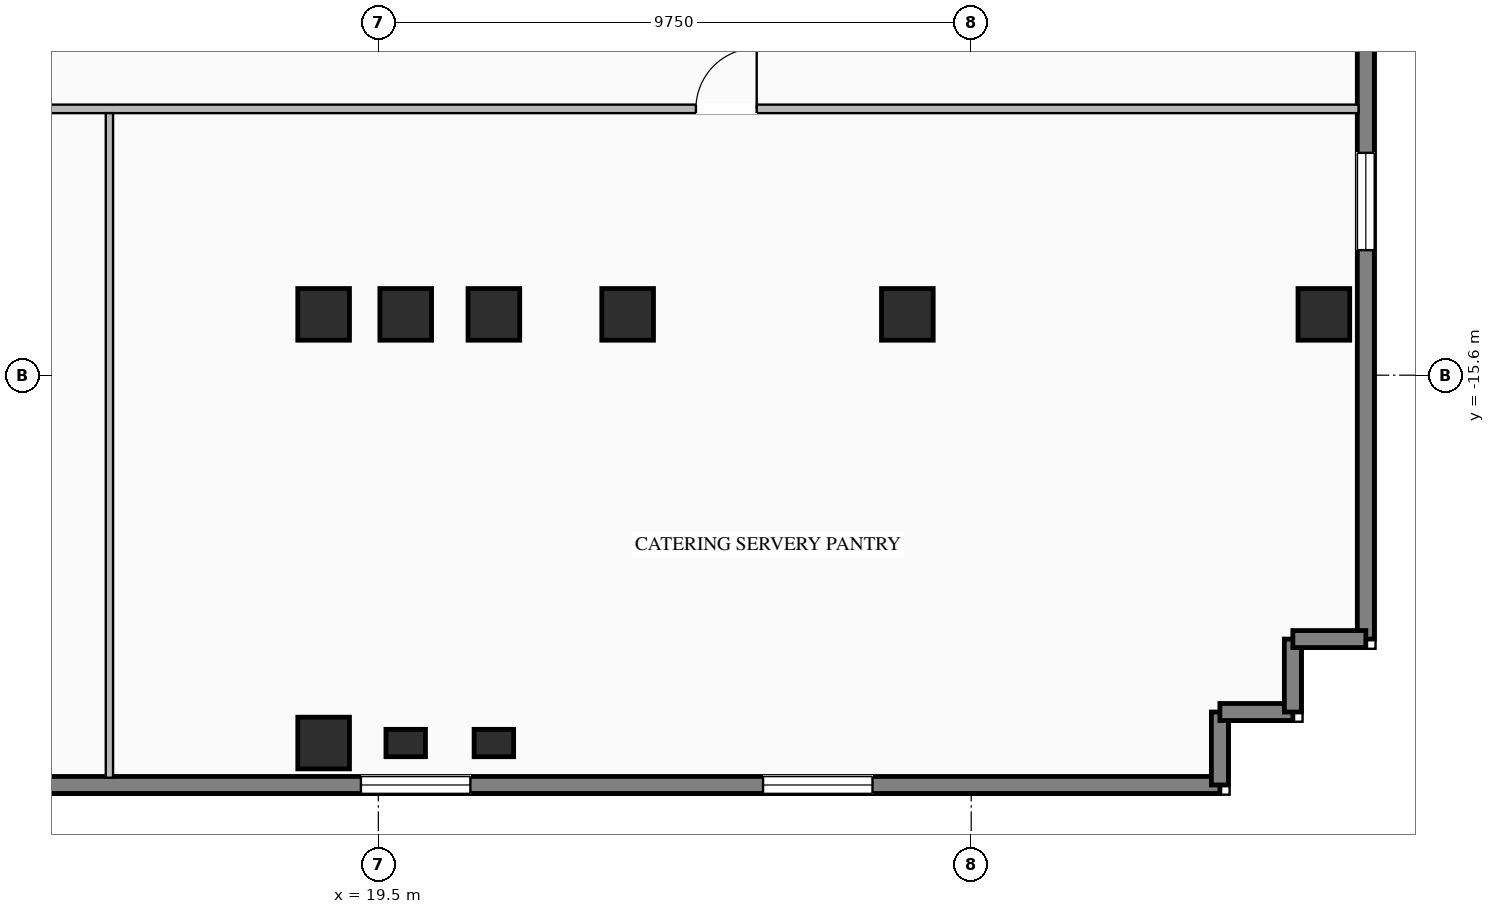
"""IFC4 building model, lengths in metres.
Left out: names, types, materials, properties, quantities, classifications, styles, units other than length and angle.
Written with IfcOpenShell. Run it as: python <this file> out.ifc"""

import sys

from ifc_helpers import new_model, si_unit, direction, frame, frame_2d, origin, origin_2d, place, context, subcontext, project, spatial, rectangle, i_section, extrude, element, fill, save


model = new_model("IFC4")
c1 = context("Model", 3, precision=1e-05, world=origin(), true_north=direction((0.0, 1.0)))
c2 = subcontext(c1, "Body", "Model", "MODEL_VIEW")
j1 = project(units=[si_unit("LENGTHUNIT", "METRE"), si_unit("PLANEANGLEUNIT", "RADIAN")], contexts=[c1])
p1 = place(None, origin())
s1 = spatial("IfcSite", under=j1, at=p1, CompositionType="ELEMENT")
p2 = place(p1, origin())
s2 = spatial("IfcBuilding", under=s1, at=p2, CompositionType="ELEMENT")
p3 = place(p2, frame((0.0, 0.0, 31.2)))
s3 = spatial("IfcBuildingStorey", under=s2, at=p3, CompositionType="ELEMENT", Elevation=31.2)
for number, where, z_axis, x_axis in (
    (1, (18.6, -14.6, 0.0), (0.0, 0.0, 1.0), (1.0, 0.0, 0.0)),
    (2, (19.95, -14.6, 0.0), (0.0, 0.0, 1.0), (1.0, 0.0, 0.0)),
    (3, (21.4, -14.6, 0.0), (0.0, 0.0, 1.0), (1.0, 0.0, 0.0)),
    (4, (23.6, -14.6, 0.0), (0.0, 0.0, 1.0), (1.0, 0.0, 0.0)),
    (5, (28.2, -14.6, 0.0), (0.0, 0.0, 1.0), (1.0, 0.0, 0.0)),
    (6, (18.6, -21.65, 0.0), (0.0, 0.0, 1.0), (1.0, 0.0, 0.0)),
    (7, (35.05, -14.6, 0.0), (0.0, 0.0, 1.0), (1.0, 0.0, 0.0)),
):
    element("IfcColumn", number, at=place(p3, frame(where, z_axis=z_axis, x_axis=x_axis)), inside=s3, PredefinedType="COLUMN", context=c2, shape_type="SweptSolid", body=[
        extrude(i_section(OverallWidth=0.85, OverallDepth=0.85, WebThickness=0.032, FlangeThickness=0.048, at=origin_2d()), origin(), (0.0, 0.0, 1.0), 3.45),
    ])
for number, where, z_axis, x_axis in (
    (8, (19.95, -21.65, 0.0), (0.0, 0.0, 1.0), (1.0, 0.0, 0.0)),
    (9, (21.4, -21.65, 0.0), (0.0, 0.0, 1.0), (1.0, 0.0, 0.0)),
):
    element("IfcColumn", number, at=place(p3, frame(where, z_axis=z_axis, x_axis=x_axis)), inside=s3, PredefinedType="PILASTER", context=c2, shape_type="SweptSolid", body=[
        extrude(rectangle(XDim=0.65, YDim=0.45, at=origin_2d()), origin(), (0.0, 0.0, 1.0), 3.45),
    ])
p4 = place(p3, frame((33.34, -22.34, 0.0), z_axis=(0.0, 0.0, 1.0), x_axis=(-1.0, 0.0, 0.0)))
e10 = element("IfcWall", 10, at=p4, inside=s3, PredefinedType="STANDARD", context=c2, shape_type="SweptSolid", body=[
    extrude(rectangle(XDim=19.84, YDim=0.28, at=frame_2d((9.92, 0.0))), origin(), (0.0, 0.0, 1.0), 3.25),
])
p5 = place(p4, frame((5.713, 0.0, 0.76)))
e11 = element("IfcOpeningElement", 11, at=p5, cuts=e10, PredefinedType="OPENING", context=c2, shape_type="SweptSolid", body=[
    extrude(rectangle(XDim=1.8, YDim=1.95, at=frame_2d((0.9, 0.975))), frame((0.0, 0.15, 0.0), z_axis=(0.0, -1.0, 0.0), x_axis=(1.0, 0.0, 0.0)), (0.0, 0.0, 1.0), 0.3),
])
p6 = place(p4, frame((12.327, 0.0, 0.76)))
e12 = element("IfcOpeningElement", 12, at=p6, cuts=e10, PredefinedType="OPENING", context=c2, shape_type="SweptSolid", body=[
    extrude(rectangle(XDim=1.8, YDim=1.95, at=frame_2d((0.9, 0.975))), frame((0.0, 0.15, 0.0), z_axis=(0.0, -1.0, 0.0), x_axis=(1.0, 0.0, 0.0)), (0.0, 0.0, 1.0), 0.3),
])
p7 = place(p3, frame((35.74, 0.0, 0.0), z_axis=(0.0, 0.0, 1.0), x_axis=(0.0, -1.0, 0.0)))
e13 = element("IfcWall", 13, at=p7, inside=s3, PredefinedType="STANDARD", context=c2, shape_type="SweptSolid", body=[
    extrude(rectangle(XDim=19.94, YDim=0.28, at=frame_2d((9.97, 0.0))), origin(), (0.0, 0.0, 1.0), 3.25),
])
p8 = place(p7, frame((5.847, 0.0, 0.76)))
e14 = element("IfcOpeningElement", 14, at=p8, cuts=e13, PredefinedType="OPENING", context=c2, shape_type="SweptSolid", body=[
    extrude(rectangle(XDim=1.6, YDim=1.95, at=frame_2d((0.8, 0.975))), frame((0.0, 0.15, 0.0), z_axis=(0.0, -1.0, 0.0), x_axis=(1.0, 0.0, 0.0)), (0.0, 0.0, 1.0), 0.3),
])
p9 = place(p7, frame((11.943, 0.0, 0.76)))
e15 = element("IfcOpeningElement", 15, at=p9, cuts=e13, PredefinedType="OPENING", context=c2, shape_type="SweptSolid", body=[
    extrude(rectangle(XDim=1.6, YDim=1.95, at=frame_2d((0.8, 0.975))), frame((0.0, 0.15, 0.0), z_axis=(0.0, -1.0, 0.0), x_axis=(1.0, 0.0, 0.0)), (0.0, 0.0, 1.0), 0.3),
])
p10 = place(p3, frame((33.34, -22.34, 0.0), z_axis=(0.0, 0.0, 1.0), x_axis=(0.0, 1.0, 0.0)))
e16 = element("IfcWall", 16, at=p10, inside=s3, PredefinedType="STANDARD", context=c2, shape_type="SweptSolid", body=[
    extrude(rectangle(XDim=1.2, YDim=0.28, at=frame_2d((0.6, 0.0))), origin(), (0.0, 0.0, 1.0), 3.25),
])
for number, where, z_axis, x_axis in (
    (17, (33.34, -21.14, 0.0), (0.0, 0.0, 1.0), (1.0, 0.0, 0.0)),
    (18, (34.54, -21.14, 0.0), (0.0, 0.0, 1.0), (0.0, 1.0, 0.0)),
    (19, (34.54, -19.94, 0.0), (0.0, 0.0, 1.0), (1.0, 0.0, 0.0)),
):
    element("IfcWall", number, at=place(p3, frame(where, z_axis=z_axis, x_axis=x_axis)), inside=s3, PredefinedType="STANDARD", context=c2, shape_type="SweptSolid", body=[
        extrude(rectangle(XDim=1.2, YDim=0.28, at=frame_2d((0.6, 0.0))), origin(), (0.0, 0.0, 1.0), 3.25),
    ])
p11 = place(p3, frame((-35.62, -11.22, 0.0), z_axis=(0.0, 0.0, 1.0), x_axis=(1.0, 0.0, 0.0)))
e20 = element("IfcWall", 20, at=p11, inside=s3, PredefinedType="STANDARD", context=c2, shape_type="SweptSolid", body=[
    extrude(rectangle(XDim=71.24, YDim=0.14, at=frame_2d((35.62, 0.0))), origin(), (0.0, 0.0, 1.0), 2.745),
])
p12 = place(p11, frame((22.71, 0.0, 0.0)))
e21 = element("IfcOpeningElement", 21, at=p12, cuts=e20, PredefinedType="OPENING", context=c2, shape_type="SweptSolid", body=[
    extrude(rectangle(XDim=0.92, YDim=2.08, at=frame_2d((0.46, 1.04))), frame((0.0, 0.08, 0.0), z_axis=(0.0, -1.0, 0.0), x_axis=(1.0, 0.0, 0.0)), (0.0, 0.0, 1.0), 0.16),
])
p13 = place(p11, frame((26.21, 0.0, 0.0)))
e22 = element("IfcOpeningElement", 22, at=p13, cuts=e20, PredefinedType="OPENING", context=c2, shape_type="SweptSolid", body=[
    extrude(rectangle(XDim=0.92, YDim=2.08, at=frame_2d((0.46, 1.04))), frame((0.0, 0.08, 0.0), z_axis=(0.0, -1.0, 0.0), x_axis=(1.0, 0.0, 0.0)), (0.0, 0.0, 1.0), 0.16),
])
p14 = place(p11, frame((29.06, 0.0, 0.0)))
e23 = element("IfcOpeningElement", 23, at=p14, cuts=e20, PredefinedType="OPENING", context=c2, shape_type="SweptSolid", body=[
    extrude(rectangle(XDim=0.92, YDim=2.08, at=frame_2d((0.46, 1.04))), frame((0.0, 0.08, 0.0), z_axis=(0.0, -1.0, 0.0), x_axis=(1.0, 0.0, 0.0)), (0.0, 0.0, 1.0), 0.16),
])
p15 = place(p11, frame((4.942, 0.0, 0.0)))
e24 = element("IfcOpeningElement", 24, at=p15, cuts=e20, PredefinedType="OPENING", context=c2, shape_type="SweptSolid", body=[
    extrude(rectangle(XDim=1.0, YDim=2.08, at=frame_2d((0.5, 1.04))), frame((0.0, 0.08, 0.0), z_axis=(0.0, -1.0, 0.0), x_axis=(1.0, 0.0, 0.0)), (0.0, 0.0, 1.0), 0.16),
])
p16 = place(p11, frame((15.527, 0.0, 0.0)))
e25 = element("IfcOpeningElement", 25, at=p16, cuts=e20, PredefinedType="OPENING", context=c2, shape_type="SweptSolid", body=[
    extrude(rectangle(XDim=1.0, YDim=2.08, at=frame_2d((0.5, 1.04))), frame((0.0, 0.08, 0.0), z_axis=(0.0, -1.0, 0.0), x_axis=(1.0, 0.0, 0.0)), (0.0, 0.0, 1.0), 0.16),
])
p17 = place(p11, frame((40.158, 0.0, 0.0)))
e26 = element("IfcOpeningElement", 26, at=p17, cuts=e20, PredefinedType="OPENING", context=c2, shape_type="SweptSolid", body=[
    extrude(rectangle(XDim=1.0, YDim=2.08, at=frame_2d((0.5, 1.04))), frame((0.0, 0.08, 0.0), z_axis=(0.0, -1.0, 0.0), x_axis=(1.0, 0.0, 0.0)), (0.0, 0.0, 1.0), 0.16),
])
p18 = place(p11, frame((60.343, 0.0, 0.0)))
e27 = element("IfcOpeningElement", 27, at=p18, cuts=e20, PredefinedType="OPENING", context=c2, shape_type="SweptSolid", body=[
    extrude(rectangle(XDim=1.0, YDim=2.08, at=frame_2d((0.5, 1.04))), frame((0.0, 0.08, 0.0), z_axis=(0.0, -1.0, 0.0), x_axis=(1.0, 0.0, 0.0)), (0.0, 0.0, 1.0), 0.16),
])
p19 = place(p3, frame((15.077, -22.22, 0.0), z_axis=(0.0, 0.0, 1.0), x_axis=(0.0, 1.0, 0.0)))
e28 = element("IfcWall", 28, at=p19, inside=s3, PredefinedType="STANDARD", context=c2, shape_type="SweptSolid", body=[
    extrude(rectangle(XDim=10.93, YDim=0.12, at=frame_2d((5.465, 0.0))), origin(), (0.0, 0.0, 1.0), 3.25),
])
p20 = place(p5, origin())
e29 = element("IfcWindow", 29, at=p20, inside=s3, PartitioningType="SINGLE_PANEL", PredefinedType="WINDOW", context=c2, shape_type="SweptSolid", body=[
    extrude(rectangle(XDim=1.8, YDim=1.95, at=frame_2d((0.9, 0.975))), frame((0.0, 0.03, 0.0), z_axis=(0.0, -1.0, 0.0), x_axis=(1.0, 0.0, 0.0)), (0.0, 0.0, 1.0), 0.06),
])
fill(e11, e29)
p21 = place(p6, origin())
e30 = element("IfcWindow", 30, at=p21, inside=s3, PartitioningType="SINGLE_PANEL", PredefinedType="WINDOW", context=c2, shape_type="SweptSolid", body=[
    extrude(rectangle(XDim=1.8, YDim=1.95, at=frame_2d((0.9, 0.975))), frame((0.0, 0.03, 0.0), z_axis=(0.0, -1.0, 0.0), x_axis=(1.0, 0.0, 0.0)), (0.0, 0.0, 1.0), 0.06),
])
fill(e12, e30)
p22 = place(p9, origin())
e31 = element("IfcWindow", 31, at=p22, inside=s3, PartitioningType="SINGLE_PANEL", PredefinedType="WINDOW", context=c2, shape_type="SweptSolid", body=[
    extrude(rectangle(XDim=1.6, YDim=1.95, at=frame_2d((0.8, 0.975))), frame((0.0, 0.03, 0.0), z_axis=(0.0, -1.0, 0.0), x_axis=(1.0, 0.0, 0.0)), (0.0, 0.0, 1.0), 0.06),
])
fill(e15, e31)
p23 = place(p18, origin())
e32 = element("IfcDoor", 32, at=p23, inside=s3, OperationType="SINGLE_SWING_RIGHT", PredefinedType="DOOR", context=c2, shape_type="SweptSolid", body=[
    extrude(rectangle(XDim=1.0, YDim=2.08, at=frame_2d((0.5, 1.04))), frame((0.0, 0.025, 0.0), z_axis=(0.0, -1.0, 0.0), x_axis=(1.0, 0.0, 0.0)), (0.0, 0.0, 1.0), 0.05),
])
fill(e27, e32)
save(model, sys.argv[1])
